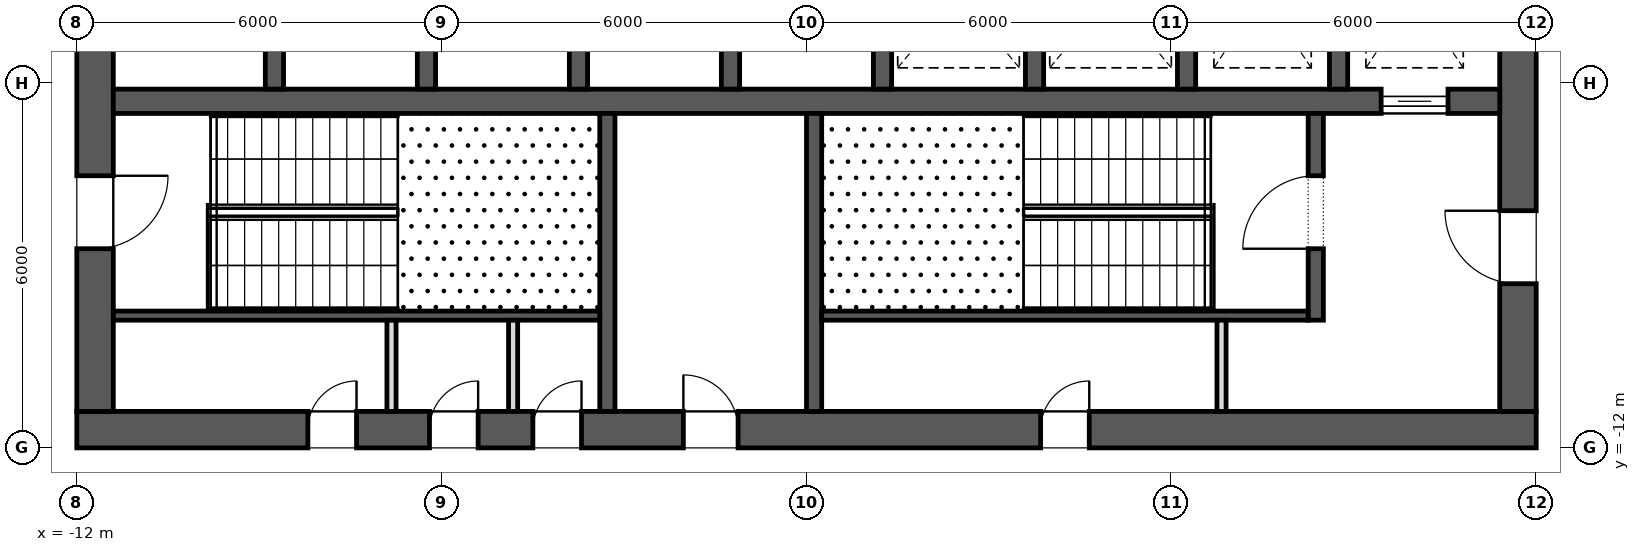
"""IFC4 building model, lengths in metres.
Left out: names, types, materials, properties, quantities, classifications, styles, units other than length and angle.
Written with IfcOpenShell. Run it as: python <this file> out.ifc"""

import sys

from ifc_helpers import new_model, si_unit, direction, frame, frame_2d, origin, place, context, subcontext, project, spatial, rectangle, extrude, element, fill, save


model = new_model("IFC4")
c1 = context("Model", 3, precision=1e-05, world=origin(), true_north=direction((0.0, 1.0)))
c2 = subcontext(c1, "Body", "Model", "MODEL_VIEW")
j1 = project(units=[si_unit("LENGTHUNIT", "METRE"), si_unit("PLANEANGLEUNIT", "RADIAN")], contexts=[c1])
p1 = place(None, origin())
s1 = spatial("IfcSite", under=j1, at=p1, CompositionType="ELEMENT")
p2 = place(p1, origin())
s2 = spatial("IfcBuilding", under=s1, at=p2, CompositionType="ELEMENT")
p3 = place(p2, frame((0.0, 0.0, 117.1)))
s3 = spatial("IfcBuildingStorey", under=s2, at=p3, CompositionType="ELEMENT", Elevation=117.1)
p4 = place(p3, frame((-12.0, -11.7, 0.0), z_axis=(0.0, 0.0, 1.0), x_axis=(1.0, 0.0, 0.0)))
e1 = element("IfcWall", 1, at=p4, inside=s3, PredefinedType="SHEAR", context=c2, shape_type="SweptSolid", body=[
    extrude(rectangle(XDim=24.0, YDim=0.6, at=frame_2d((12.0, 0.0))), origin(), (0.0, 0.0, 1.0), 4.2),
])
p5 = place(p4, frame((9.975, 0.0, 0.0)))
e2 = element("IfcOpeningElement", 2, at=p5, cuts=e1, PredefinedType="OPENING", context=c2, shape_type="SweptSolid", body=[
    extrude(rectangle(XDim=0.9, YDim=2.1, at=frame_2d((0.45, 1.05))), frame((0.0, 0.312, 0.0), z_axis=(0.0, -1.0, 0.0), x_axis=(1.0, 0.0, 0.0)), (0.0, 0.0, 1.0), 0.624),
])
p6 = place(p4, frame((3.8, 0.0, 0.0)))
e3 = element("IfcOpeningElement", 3, at=p6, cuts=e1, PredefinedType="OPENING", context=c2, shape_type="SweptSolid", body=[
    extrude(rectangle(XDim=0.8, YDim=2.1, at=frame_2d((0.4, 1.05))), frame((0.0, 0.312, 0.0), z_axis=(0.0, -1.0, 0.0), x_axis=(1.0, 0.0, 0.0)), (0.0, 0.0, 1.0), 0.624),
])
p7 = place(p4, frame((5.8, 0.0, 0.0)))
e4 = element("IfcOpeningElement", 4, at=p7, cuts=e1, PredefinedType="OPENING", context=c2, shape_type="SweptSolid", body=[
    extrude(rectangle(XDim=0.8, YDim=2.1, at=frame_2d((0.4, 1.05))), frame((0.0, 0.312, 0.0), z_axis=(0.0, -1.0, 0.0), x_axis=(1.0, 0.0, 0.0)), (0.0, 0.0, 1.0), 0.624),
])
p8 = place(p4, frame((7.5, 0.0, 0.0)))
e5 = element("IfcOpeningElement", 5, at=p8, cuts=e1, PredefinedType="OPENING", context=c2, shape_type="SweptSolid", body=[
    extrude(rectangle(XDim=0.8, YDim=2.1, at=frame_2d((0.4, 1.05))), frame((0.0, 0.312, 0.0), z_axis=(0.0, -1.0, 0.0), x_axis=(1.0, 0.0, 0.0)), (0.0, 0.0, 1.0), 0.624),
])
p9 = place(p4, frame((15.85, 0.0, 0.0)))
e6 = element("IfcOpeningElement", 6, at=p9, cuts=e1, PredefinedType="OPENING", context=c2, shape_type="SweptSolid", body=[
    extrude(rectangle(XDim=0.8, YDim=2.1, at=frame_2d((0.4, 1.05))), frame((0.0, 0.312, 0.0), z_axis=(0.0, -1.0, 0.0), x_axis=(1.0, 0.0, 0.0)), (0.0, 0.0, 1.0), 0.624),
])
p10 = place(p3, frame((11.7, -11.4, 0.0), z_axis=(0.0, 0.0, 1.0), x_axis=(0.0, 1.0, 0.0)))
e7 = element("IfcWall", 7, at=p10, inside=s3, PredefinedType="SHEAR", context=c2, shape_type="SweptSolid", body=[
    extrude(rectangle(XDim=22.8, YDim=0.6, at=frame_2d((11.4, 0.0))), origin(), (0.0, 0.0, 1.0), 4.2),
])
p11 = place(p10, frame((10.2, 0.0, 0.0)))
e8 = element("IfcOpeningElement", 8, at=p11, cuts=e7, PredefinedType="OPENING", context=c2, shape_type="SweptSolid", body=[
    extrude(rectangle(XDim=2.4, YDim=2.1, at=frame_2d((1.2, 1.05))), frame((0.0, 0.312, 0.0), z_axis=(0.0, -1.0, 0.0), x_axis=(1.0, 0.0, 0.0)), (0.0, 0.0, 1.0), 0.624),
])
p12 = place(p10, frame((19.5, 0.0, 0.0)))
e9 = element("IfcOpeningElement", 9, at=p12, cuts=e7, PredefinedType="OPENING", context=c2, shape_type="SweptSolid", body=[
    extrude(rectangle(XDim=1.2, YDim=2.1, at=frame_2d((0.6, 1.05))), frame((0.0, 0.312, 0.0), z_axis=(0.0, -1.0, 0.0), x_axis=(1.0, 0.0, 0.0)), (0.0, 0.0, 1.0), 0.624),
])
p13 = place(p10, frame((2.1, 0.0, 0.0)))
e10 = element("IfcOpeningElement", 10, at=p13, cuts=e7, PredefinedType="OPENING", context=c2, shape_type="SweptSolid", body=[
    extrude(rectangle(XDim=1.2, YDim=2.1, at=frame_2d((0.6, 1.05))), frame((0.0, 0.312, 0.0), z_axis=(0.0, -1.0, 0.0), x_axis=(1.0, 0.0, 0.0)), (0.0, 0.0, 1.0), 0.624),
])
p14 = place(p3, frame((-11.7, -11.4, 0.0), z_axis=(0.0, 0.0, 1.0), x_axis=(0.0, 1.0, 0.0)))
e11 = element("IfcWall", 11, at=p14, inside=s3, PredefinedType="SHEAR", context=c2, shape_type="SweptSolid", body=[
    extrude(rectangle(XDim=22.8, YDim=0.6, at=frame_2d((11.4, 0.0))), origin(), (0.0, 0.0, 1.0), 4.2),
])
p15 = place(p14, frame((10.2, 0.0, 0.0)))
e12 = element("IfcOpeningElement", 12, at=p15, cuts=e11, PredefinedType="OPENING", context=c2, shape_type="SweptSolid", body=[
    extrude(rectangle(XDim=2.4, YDim=2.1, at=frame_2d((1.2, 1.05))), frame((0.0, 0.312, 0.0), z_axis=(0.0, -1.0, 0.0), x_axis=(1.0, 0.0, 0.0)), (0.0, 0.0, 1.0), 0.624),
])
p16 = place(p14, frame((18.925, 0.0, 0.0)))
e13 = element("IfcOpeningElement", 13, at=p16, cuts=e11, PredefinedType="OPENING", context=c2, shape_type="SweptSolid", body=[
    extrude(rectangle(XDim=1.2, YDim=2.1, at=frame_2d((0.6, 1.05))), frame((0.0, 0.312, 0.0), z_axis=(0.0, -1.0, 0.0), x_axis=(1.0, 0.0, 0.0)), (0.0, 0.0, 1.0), 0.624),
])
p17 = place(p14, frame((2.675, 0.0, 0.0)))
e14 = element("IfcOpeningElement", 14, at=p17, cuts=e11, PredefinedType="OPENING", context=c2, shape_type="SweptSolid", body=[
    extrude(rectangle(XDim=1.2, YDim=2.1, at=frame_2d((0.6, 1.05))), frame((0.0, 0.312, 0.0), z_axis=(0.0, -1.0, 0.0), x_axis=(1.0, 0.0, 0.0)), (0.0, 0.0, 1.0), 0.624),
])
p18 = place(p3, frame((-11.4, -6.3, 0.0), z_axis=(0.0, 0.0, 1.0), x_axis=(1.0, 0.0, 0.0)))
e15 = element("IfcWall", 15, at=p18, inside=s3, PredefinedType="SHEAR", context=c2, shape_type="SweptSolid", body=[
    extrude(rectangle(XDim=22.8, YDim=0.4, at=frame_2d((11.4, 0.0))), origin(), (0.0, 0.0, 1.0), 4.2),
])
p19 = place(p18, frame((20.85, 0.0, 0.0)))
e16 = element("IfcOpeningElement", 16, at=p19, cuts=e15, PredefinedType="OPENING", context=c2, shape_type="SweptSolid", body=[
    extrude(rectangle(XDim=1.1, YDim=2.1, at=frame_2d((0.55, 1.05))), frame((0.0, 0.212, 0.0), z_axis=(0.0, -1.0, 0.0), x_axis=(1.0, 0.0, 0.0)), (0.0, 0.0, 1.0), 0.424),
])
for number, where, z_axis, x_axis in (
    (17, (-8.75, -6.1, 0.0), (0.0, 0.0, 1.0), (0.0, 1.0, 0.0)),
    (18, (-6.25, -6.1, 0.0), (0.0, 0.0, 1.0), (0.0, 1.0, 0.0)),
    (19, (-3.75, -6.1, 0.0), (0.0, 0.0, 1.0), (0.0, 1.0, 0.0)),
    (20, (-1.25, -6.1, 0.0), (0.0, 0.0, 1.0), (0.0, 1.0, 0.0)),
    (21, (1.25, -6.1, 0.0), (0.0, 0.0, 1.0), (0.0, 1.0, 0.0)),
    (22, (3.75, -6.1, 0.0), (0.0, 0.0, 1.0), (0.0, 1.0, 0.0)),
    (23, (6.25, -6.1, 0.0), (0.0, 0.0, 1.0), (0.0, 1.0, 0.0)),
    (24, (8.75, -6.1, 0.0), (0.0, 0.0, 1.0), (0.0, 1.0, 0.0)),
):
    element("IfcWall", number, at=place(p3, frame(where, z_axis=z_axis, x_axis=x_axis)), inside=s3, PredefinedType="SHEAR", context=c2, shape_type="SweptSolid", body=[
        extrude(rectangle(XDim=2.9, YDim=0.3, at=frame_2d((1.45, 0.0))), origin(), (0.0, 0.0, 1.0), 4.2),
    ])
for number, where, z_axis, x_axis in (
    (25, (-3.275, -11.4, 0.0), (0.0, 0.0, 1.0), (0.0, 1.0, 0.0)),
    (26, (0.125, -11.4, 0.0), (0.0, 0.0, 1.0), (0.0, 1.0, 0.0)),
):
    element("IfcWall", number, at=place(p3, frame(where, z_axis=z_axis, x_axis=x_axis)), inside=s3, PredefinedType="SHEAR", context=c2, shape_type="SweptSolid", body=[
        extrude(rectangle(XDim=4.9, YDim=0.25, at=frame_2d((2.45, 0.0))), origin(), (0.0, 0.0, 1.0), 3.9),
    ])
p20 = place(p3, frame((8.375, -9.9, 0.0), z_axis=(0.0, 0.0, 1.0), x_axis=(0.0, 1.0, 0.0)))
e27 = element("IfcWall", 27, at=p20, inside=s3, PredefinedType="SHEAR", context=c2, shape_type="SweptSolid", body=[
    extrude(rectangle(XDim=3.4, YDim=0.25, at=frame_2d((1.7, 0.0))), origin(), (0.0, 0.0, 1.0), 3.9),
])
p21 = place(p20, frame((1.175, 0.0, 0.0)))
e28 = element("IfcOpeningElement", 28, at=p21, cuts=e27, PredefinedType="OPENING", context=c2, shape_type="SweptSolid", body=[
    extrude(rectangle(XDim=1.2, YDim=2.1, at=frame_2d((0.6, 1.05))), frame((0.0, 0.137, 0.0), z_axis=(0.0, -1.0, 0.0), x_axis=(1.0, 0.0, 0.0)), (0.0, 0.0, 1.0), 0.274),
])
for number, where, z_axis, x_axis in (
    (29, (-11.4, -9.825, 0.0), (0.0, 0.0, 1.0), (1.0, 0.0, 0.0)),
    (30, (0.25, -9.825, 0.0), (0.0, 0.0, 1.0), (1.0, 0.0, 0.0)),
):
    element("IfcWall", number, at=place(p3, frame(where, z_axis=z_axis, x_axis=x_axis)), inside=s3, PredefinedType="SHEAR", context=c2, shape_type="SweptSolid", body=[
        extrude(rectangle(XDim=8.0, YDim=0.15, at=frame_2d((4.0, 0.0))), origin(), (0.0, 0.0, 1.0), 3.9),
    ])
for number, where, z_axis, x_axis in (
    (31, (-6.825, -11.4, 0.0), (0.0, 0.0, 1.0), (0.0, 1.0, 0.0)),
    (32, (-4.825, -11.4, 0.0), (0.0, 0.0, 1.0), (0.0, 1.0, 0.0)),
    (33, (6.825, -11.4, 0.0), (0.0, 0.0, 1.0), (0.0, 1.0, 0.0)),
):
    element("IfcWall", number, at=place(p3, frame(where, z_axis=z_axis, x_axis=x_axis)), inside=s3, PredefinedType="PARTITIONING", context=c2, shape_type="SweptSolid", body=[
        extrude(rectangle(XDim=1.5, YDim=0.15, at=frame_2d((0.75, 0.0))), origin(), (0.0, 0.0, 1.0), 3.9),
    ])
p22 = place(p19, origin())
e34 = element("IfcDoor", 34, at=p22, inside=s3, OperationType="SLIDING_TO_LEFT", PredefinedType="DOOR", context=c2, shape_type="SweptSolid", body=[
    extrude(rectangle(XDim=1.1, YDim=2.1, at=frame_2d((0.55, 1.05))), frame((0.0, 0.025, 0.0), z_axis=(0.0, -1.0, 0.0), x_axis=(1.0, 0.0, 0.0)), (0.0, 0.0, 1.0), 0.05),
])
fill(e16, e34)
p23 = place(p17, frame((1.2, 0.0, 0.0), z_axis=(0.0, 0.0, 1.0), x_axis=(-1.0, 0.0, 0.0)))
e35 = element("IfcDoor", 35, at=p23, inside=s3, OperationType="SINGLE_SWING_RIGHT", PredefinedType="DOOR", context=c2, shape_type="SweptSolid", body=[
    extrude(rectangle(XDim=1.2, YDim=2.1, at=frame_2d((0.6, 1.05))), frame((0.0, 0.025, 0.0), z_axis=(0.0, -1.0, 0.0), x_axis=(1.0, 0.0, 0.0)), (0.0, 0.0, 1.0), 0.05),
])
fill(e14, e35)
p24 = place(p21, origin())
e36 = element("IfcDoor", 36, at=p24, inside=s3, OperationType="SINGLE_SWING_RIGHT", PredefinedType="DOOR", context=c2, shape_type="SweptSolid", body=[
    extrude(rectangle(XDim=1.2, YDim=2.1, at=frame_2d((0.6, 1.05))), frame((0.0, 0.025, 0.0), z_axis=(0.0, -1.0, 0.0), x_axis=(1.0, 0.0, 0.0)), (0.0, 0.0, 1.0), 0.05),
])
fill(e28, e36)
p25 = place(p13, origin())
e37 = element("IfcDoor", 37, at=p25, inside=s3, OperationType="SINGLE_SWING_LEFT", PredefinedType="DOOR", context=c2, shape_type="SweptSolid", body=[
    extrude(rectangle(XDim=1.2, YDim=2.1, at=frame_2d((0.6, 1.05))), frame((0.0, 0.025, 0.0), z_axis=(0.0, -1.0, 0.0), x_axis=(1.0, 0.0, 0.0)), (0.0, 0.0, 1.0), 0.05),
])
fill(e10, e37)
p26 = place(p5, origin())
e38 = element("IfcDoor", 38, at=p26, inside=s3, OperationType="SINGLE_SWING_RIGHT", PredefinedType="DOOR", context=c2, shape_type="SweptSolid", body=[
    extrude(rectangle(XDim=0.9, YDim=2.1, at=frame_2d((0.45, 1.05))), frame((0.0, 0.025, 0.0), z_axis=(0.0, -1.0, 0.0), x_axis=(1.0, 0.0, 0.0)), (0.0, 0.0, 1.0), 0.05),
])
fill(e2, e38)
p27 = place(p6, origin())
e39 = element("IfcDoor", 39, at=p27, inside=s3, OperationType="SINGLE_SWING_LEFT", PredefinedType="DOOR", context=c2, shape_type="SweptSolid", body=[
    extrude(rectangle(XDim=0.8, YDim=2.1, at=frame_2d((0.4, 1.05))), frame((0.0, 0.025, 0.0), z_axis=(0.0, -1.0, 0.0), x_axis=(1.0, 0.0, 0.0)), (0.0, 0.0, 1.0), 0.05),
])
fill(e3, e39)
p28 = place(p7, origin())
e40 = element("IfcDoor", 40, at=p28, inside=s3, OperationType="SINGLE_SWING_LEFT", PredefinedType="DOOR", context=c2, shape_type="SweptSolid", body=[
    extrude(rectangle(XDim=0.8, YDim=2.1, at=frame_2d((0.4, 1.05))), frame((0.0, 0.025, 0.0), z_axis=(0.0, -1.0, 0.0), x_axis=(1.0, 0.0, 0.0)), (0.0, 0.0, 1.0), 0.05),
])
fill(e4, e40)
p29 = place(p8, origin())
e41 = element("IfcDoor", 41, at=p29, inside=s3, OperationType="SINGLE_SWING_LEFT", PredefinedType="DOOR", context=c2, shape_type="SweptSolid", body=[
    extrude(rectangle(XDim=0.8, YDim=2.1, at=frame_2d((0.4, 1.05))), frame((0.0, 0.025, 0.0), z_axis=(0.0, -1.0, 0.0), x_axis=(1.0, 0.0, 0.0)), (0.0, 0.0, 1.0), 0.05),
])
fill(e5, e41)
p30 = place(p9, origin())
e42 = element("IfcDoor", 42, at=p30, inside=s3, OperationType="SINGLE_SWING_LEFT", PredefinedType="DOOR", context=c2, shape_type="SweptSolid", body=[
    extrude(rectangle(XDim=0.8, YDim=2.1, at=frame_2d((0.4, 1.05))), frame((0.0, 0.025, 0.0), z_axis=(0.0, -1.0, 0.0), x_axis=(1.0, 0.0, 0.0)), (0.0, 0.0, 1.0), 0.05),
])
fill(e6, e42)
save(model, sys.argv[1])
